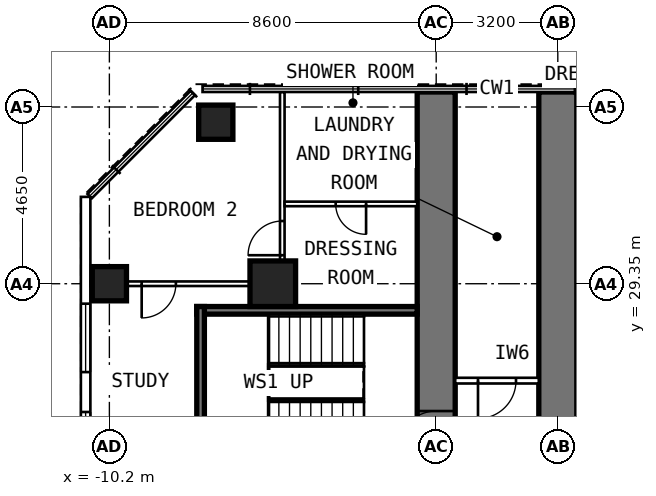
"""IFC4 building model, lengths in metres.
Left out: names, types, materials, properties, quantities, classifications, styles, units other than length and angle.
Written with IfcOpenShell. Run it as: python <this file> out.ifc"""

import sys

from ifc_helpers import new_model, si_unit, direction, frame, frame_2d, origin, origin_2d, place, context, subcontext, project, spatial, rectangle, extrude, element, fill, save


model = new_model("IFC4")
c1 = context("Model", 3, precision=1e-05, world=origin(), true_north=direction((0.0, 1.0)))
c2 = subcontext(c1, "Body", "Model", "MODEL_VIEW")
j1 = project(units=[si_unit("LENGTHUNIT", "METRE"), si_unit("PLANEANGLEUNIT", "RADIAN")], contexts=[c1])
p1 = place(None, origin())
s1 = spatial("IfcSite", under=j1, at=p1, CompositionType="ELEMENT")
p2 = place(p1, origin())
s2 = spatial("IfcBuilding", under=s1, at=p2, CompositionType="ELEMENT")
p3 = place(p2, frame((0.0, 0.0, 98.8)))
s3 = spatial("IfcBuildingStorey", under=s2, at=p3, CompositionType="ELEMENT", Elevation=98.8)
for number, where, z_axis, x_axis in (
    (1, (-10.2, 29.35, 0.0), (0.0, 0.0, 1.0), (0.0, 1.0, 0.0)),
    (2, (-7.4, 33.6, 0.0), (0.0, 0.0, 1.0), (0.0, 1.0, 0.0)),
):
    element("IfcColumn", number, at=place(p3, frame(where, z_axis=z_axis, x_axis=x_axis)), inside=s3, PredefinedType="COLUMN", context=c2, shape_type="SweptSolid", body=[
        extrude(rectangle(XDim=0.9, YDim=0.9, at=origin_2d()), origin(), (0.0, 0.0, 1.0), 3.6),
    ])
p4 = place(p3, frame((-5.9, 29.35, 0.0), z_axis=(0.0, 0.0, 1.0), x_axis=(0.0, 1.0, 0.0)))
e3 = element("IfcColumn", 3, at=p4, inside=s3, PredefinedType="COLUMN", context=c2, shape_type="SweptSolid", body=[
    extrude(rectangle(XDim=1.2, YDim=1.2, at=origin_2d()), origin(), (0.0, 0.0, 1.0), 3.6),
])
p5 = place(p3, frame((-1.6, 23.65, 0.0), z_axis=(0.0, 0.0, 1.0), x_axis=(0.0, 1.0, 0.0)))
e4 = element("IfcWall", 4, at=p5, inside=s3, PredefinedType="SHEAR", context=c2, shape_type="SweptSolid", body=[
    extrude(rectangle(XDim=10.745, YDim=1.0, at=frame_2d((5.373, 0.0))), origin(), (0.0, 0.0, 1.0), 3.6),
])
p6 = place(p5, frame((1.35, 0.0, 0.0)))
e5 = element("IfcOpeningElement", 5, at=p6, cuts=e4, PredefinedType="OPENING", context=c2, shape_type="SweptSolid", body=[
    extrude(rectangle(XDim=1.0, YDim=2.1, at=frame_2d((0.5, 1.05))), frame((0.0, 0.512, 0.0), z_axis=(0.0, -1.0, 0.0), x_axis=(1.0, 0.0, 0.0)), (0.0, 0.0, 1.0), 1.024),
])
p7 = place(p3, frame((1.6, 23.65, 0.0), z_axis=(0.0, 0.0, 1.0), x_axis=(0.0, 1.0, 0.0)))
e6 = element("IfcWall", 6, at=p7, inside=s3, PredefinedType="SHEAR", context=c2, shape_type="SweptSolid", body=[
    extrude(rectangle(XDim=10.745, YDim=1.0, at=frame_2d((5.373, 0.0))), origin(), (0.0, 0.0, 1.0), 3.6),
])
p8 = place(p3, frame((-10.825, 6.148, 0.0), z_axis=(0.0, 0.0, 1.0), x_axis=(0.0, 1.0, 0.0)))
e7 = element("IfcWall", 7, at=p8, inside=s3, PredefinedType="SOLIDWALL", context=c2, shape_type="SweptSolid", body=[
    extrude(rectangle(XDim=25.487, YDim=0.25, at=frame_2d((12.744, 0.0))), origin(), (0.0, 0.0, 1.0), 3.35),
])
p9 = place(p8, frame((0.927, 0.0, 0.8)))
e8 = element("IfcOpeningElement", 8, at=p9, cuts=e7, PredefinedType="OPENING", context=c2, shape_type="SweptSolid", body=[
    extrude(rectangle(XDim=1.8, YDim=1.8, at=frame_2d((0.9, 0.9))), frame((0.0, 0.137, 0.0), z_axis=(0.0, -1.0, 0.0), x_axis=(1.0, 0.0, 0.0)), (0.0, 0.0, 1.0), 0.274),
])
p10 = place(p8, frame((3.777, 0.0, 0.8)))
e9 = element("IfcOpeningElement", 9, at=p10, cuts=e7, PredefinedType="OPENING", context=c2, shape_type="SweptSolid", body=[
    extrude(rectangle(XDim=1.8, YDim=1.8, at=frame_2d((0.9, 0.9))), frame((0.0, 0.137, 0.0), z_axis=(0.0, -1.0, 0.0), x_axis=(1.0, 0.0, 0.0)), (0.0, 0.0, 1.0), 0.274),
])
p11 = place(p8, frame((6.627, 0.0, 0.8)))
e10 = element("IfcOpeningElement", 10, at=p11, cuts=e7, PredefinedType="OPENING", context=c2, shape_type="SweptSolid", body=[
    extrude(rectangle(XDim=1.8, YDim=1.8, at=frame_2d((0.9, 0.9))), frame((0.0, 0.137, 0.0), z_axis=(0.0, -1.0, 0.0), x_axis=(1.0, 0.0, 0.0)), (0.0, 0.0, 1.0), 0.274),
])
p12 = place(p8, frame((9.477, 0.0, 0.8)))
e11 = element("IfcOpeningElement", 11, at=p12, cuts=e7, PredefinedType="OPENING", context=c2, shape_type="SweptSolid", body=[
    extrude(rectangle(XDim=1.8, YDim=1.8, at=frame_2d((0.9, 0.9))), frame((0.0, 0.137, 0.0), z_axis=(0.0, -1.0, 0.0), x_axis=(1.0, 0.0, 0.0)), (0.0, 0.0, 1.0), 0.274),
])
p13 = place(p8, frame((12.327, 0.0, 0.8)))
e12 = element("IfcOpeningElement", 12, at=p13, cuts=e7, PredefinedType="OPENING", context=c2, shape_type="SweptSolid", body=[
    extrude(rectangle(XDim=1.8, YDim=1.8, at=frame_2d((0.9, 0.9))), frame((0.0, 0.137, 0.0), z_axis=(0.0, -1.0, 0.0), x_axis=(1.0, 0.0, 0.0)), (0.0, 0.0, 1.0), 0.274),
])
p14 = place(p8, frame((15.177, 0.0, 0.8)))
e13 = element("IfcOpeningElement", 13, at=p14, cuts=e7, PredefinedType="OPENING", context=c2, shape_type="SweptSolid", body=[
    extrude(rectangle(XDim=1.8, YDim=1.8, at=frame_2d((0.9, 0.9))), frame((0.0, 0.137, 0.0), z_axis=(0.0, -1.0, 0.0), x_axis=(1.0, 0.0, 0.0)), (0.0, 0.0, 1.0), 0.274),
])
p15 = place(p8, frame((18.027, 0.0, 0.8)))
e14 = element("IfcOpeningElement", 14, at=p15, cuts=e7, PredefinedType="OPENING", context=c2, shape_type="SweptSolid", body=[
    extrude(rectangle(XDim=1.8, YDim=1.8, at=frame_2d((0.9, 0.9))), frame((0.0, 0.137, 0.0), z_axis=(0.0, -1.0, 0.0), x_axis=(1.0, 0.0, 0.0)), (0.0, 0.0, 1.0), 0.274),
])
p16 = place(p8, frame((20.877, 0.0, 0.8)))
e15 = element("IfcOpeningElement", 15, at=p16, cuts=e7, PredefinedType="OPENING", context=c2, shape_type="SweptSolid", body=[
    extrude(rectangle(XDim=1.8, YDim=1.8, at=frame_2d((0.9, 0.9))), frame((0.0, 0.137, 0.0), z_axis=(0.0, -1.0, 0.0), x_axis=(1.0, 0.0, 0.0)), (0.0, 0.0, 1.0), 0.274),
])
p17 = place(p3, frame((-5.71, 29.35, 0.0), z_axis=(0.0, 0.0, 1.0), x_axis=(-1.0, 0.0, 0.0)))
e16 = element("IfcWall", 16, at=p17, inside=s3, PredefinedType="PARTITIONING", context=c2, shape_type="SweptSolid", body=[
    extrude(rectangle(XDim=4.99, YDim=0.12, at=frame_2d((2.495, 0.0))), origin(), (0.0, 0.0, 1.0), 2.45),
])
p18 = place(p17, frame((2.74, 0.0, 0.0)))
e17 = element("IfcOpeningElement", 17, at=p18, cuts=e16, PredefinedType="OPENING", context=c2, shape_type="SweptSolid", body=[
    extrude(rectangle(XDim=0.9, YDim=2.1, at=frame_2d((0.45, 1.05))), frame((0.0, 0.072, 0.0), z_axis=(0.0, -1.0, 0.0), x_axis=(1.0, 0.0, 0.0)), (0.0, 0.0, 1.0), 0.144),
])
p19 = place(p3, frame((-5.65, 28.95, 0.0), z_axis=(0.0, 0.0, 1.0), x_axis=(0.0, 1.0, 0.0)))
e18 = element("IfcWall", 18, at=p19, inside=s3, PredefinedType="PARTITIONING", context=c2, shape_type="SweptSolid", body=[
    extrude(rectangle(XDim=5.445, YDim=0.12, at=frame_2d((2.723, 0.0))), origin(), (0.0, 0.0, 1.0), 3.35),
])
p20 = place(p19, frame((1.15, 0.0, 0.0)))
e19 = element("IfcOpeningElement", 19, at=p20, cuts=e18, PredefinedType="OPENING", context=c2, shape_type="SweptSolid", body=[
    extrude(rectangle(XDim=0.9, YDim=2.1, at=frame_2d((0.45, 1.05))), frame((0.0, 0.072, 0.0), z_axis=(0.0, -1.0, 0.0), x_axis=(1.0, 0.0, 0.0)), (0.0, 0.0, 1.0), 0.144),
])
p21 = place(p3, frame((-2.1, 31.45, 0.0), z_axis=(0.0, 0.0, 1.0), x_axis=(-1.0, 0.0, 0.0)))
e20 = element("IfcWall", 20, at=p21, inside=s3, PredefinedType="PARTITIONING", context=c2, shape_type="SweptSolid", body=[
    extrude(rectangle(XDim=3.49, YDim=0.12, at=frame_2d((1.745, 0.0))), origin(), (0.0, 0.0, 1.0), 3.35),
])
p22 = place(p21, frame((1.345, 0.0, 0.0)))
e21 = element("IfcOpeningElement", 21, at=p22, cuts=e20, PredefinedType="OPENING", context=c2, shape_type="SweptSolid", body=[
    extrude(rectangle(XDim=0.8, YDim=2.1, at=frame_2d((0.4, 1.05))), frame((0.0, 0.072, 0.0), z_axis=(0.0, -1.0, 0.0), x_axis=(1.0, 0.0, 0.0)), (0.0, 0.0, 1.0), 0.144),
])
p23 = place(p3, frame((1.1, 26.8, 0.0), z_axis=(0.0, 0.0, 1.0), x_axis=(-1.0, 0.0, 0.0)))
e22 = element("IfcWall", 22, at=p23, inside=s3, PredefinedType="PARTITIONING", context=c2, shape_type="SweptSolid", body=[
    extrude(rectangle(XDim=2.2, YDim=0.15, at=frame_2d((1.1, 0.0))), origin(), (0.0, 0.0, 1.0), 3.35),
])
p24 = place(p23, frame((0.6, 0.0, 0.0)))
e23 = element("IfcOpeningElement", 23, at=p24, cuts=e22, PredefinedType="OPENING", context=c2, shape_type="SweptSolid", body=[
    extrude(rectangle(XDim=1.0, YDim=2.1, at=frame_2d((0.5, 1.05))), frame((0.0, 0.087, 0.0), z_axis=(0.0, -1.0, 0.0), x_axis=(1.0, 0.0, 0.0)), (0.0, 0.0, 1.0), 0.174),
])
p25 = place(p3, frame((-2.1, 28.65, 0.0), z_axis=(0.0, 0.0, 1.0), x_axis=(-1.0, 0.0, 0.0)))
e24 = element("IfcWall", 24, at=p25, inside=s3, PredefinedType="SHEAR", context=c2, shape_type="SweptSolid", body=[
    extrude(rectangle(XDim=5.8, YDim=0.2, at=frame_2d((2.9, 0.0))), origin(), (0.0, 0.0, 1.0), 3.33),
])
p26 = place(p3, frame((-7.8, 24.75, 0.0), z_axis=(0.0, 0.0, 1.0), x_axis=(0.0, 1.0, 0.0)))
e25 = element("IfcWall", 25, at=p26, inside=s3, PredefinedType="SHEAR", context=c2, shape_type="SweptSolid", body=[
    extrude(rectangle(XDim=4.0, YDim=0.2, at=frame_2d((2.0, 0.0))), origin(), (0.0, 0.0, 1.0), 3.33),
])
p27 = place(p15, origin())
e26 = element("IfcWindow", 26, at=p27, inside=s3, PartitioningType="SINGLE_PANEL", PredefinedType="WINDOW", context=c2, shape_type="SweptSolid", body=[
    extrude(rectangle(XDim=1.8, YDim=1.8, at=frame_2d((0.9, 0.9))), frame((0.0, 0.03, 0.0), z_axis=(0.0, -1.0, 0.0), x_axis=(1.0, 0.0, 0.0)), (0.0, 0.0, 1.0), 0.06),
])
fill(e14, e26)
p28 = place(p16, origin())
e27 = element("IfcWindow", 27, at=p28, inside=s3, PartitioningType="SINGLE_PANEL", PredefinedType="WINDOW", context=c2, shape_type="SweptSolid", body=[
    extrude(rectangle(XDim=1.8, YDim=1.8, at=frame_2d((0.9, 0.9))), frame((0.0, 0.03, 0.0), z_axis=(0.0, -1.0, 0.0), x_axis=(1.0, 0.0, 0.0)), (0.0, 0.0, 1.0), 0.06),
])
fill(e15, e27)
p29 = place(p18, origin())
e28 = element("IfcDoor", 28, at=p29, inside=s3, OperationType="SINGLE_SWING_RIGHT", PredefinedType="DOOR", context=c2, shape_type="SweptSolid", body=[
    extrude(rectangle(XDim=0.9, YDim=2.1, at=frame_2d((0.45, 1.05))), frame((0.0, 0.025, 0.0), z_axis=(0.0, -1.0, 0.0), x_axis=(1.0, 0.0, 0.0)), (0.0, 0.0, 1.0), 0.05),
])
fill(e17, e28)
p30 = place(p20, origin())
e29 = element("IfcDoor", 29, at=p30, inside=s3, OperationType="SINGLE_SWING_LEFT", PredefinedType="DOOR", context=c2, shape_type="SweptSolid", body=[
    extrude(rectangle(XDim=0.9, YDim=2.1, at=frame_2d((0.45, 1.05))), frame((0.0, 0.025, 0.0), z_axis=(0.0, -1.0, 0.0), x_axis=(1.0, 0.0, 0.0)), (0.0, 0.0, 1.0), 0.05),
])
fill(e19, e29)
p31 = place(p22, origin())
e30 = element("IfcDoor", 30, at=p31, inside=s3, OperationType="SINGLE_SWING_LEFT", PredefinedType="DOOR", context=c2, shape_type="SweptSolid", body=[
    extrude(rectangle(XDim=0.8, YDim=2.1, at=frame_2d((0.4, 1.05))), frame((0.0, 0.025, 0.0), z_axis=(0.0, -1.0, 0.0), x_axis=(1.0, 0.0, 0.0)), (0.0, 0.0, 1.0), 0.05),
])
fill(e21, e30)
p32 = place(p24, origin())
e31 = element("IfcDoor", 31, at=p32, inside=s3, OperationType="SINGLE_SWING_RIGHT", PredefinedType="DOOR", context=c2, shape_type="SweptSolid", body=[
    extrude(rectangle(XDim=1.0, YDim=2.1, at=frame_2d((0.5, 1.05))), frame((0.0, 0.025, 0.0), z_axis=(0.0, -1.0, 0.0), x_axis=(1.0, 0.0, 0.0)), (0.0, 0.0, 1.0), 0.05),
])
fill(e23, e31)
p33 = place(p6, origin())
e32 = element("IfcDoor", 32, at=p33, inside=s3, OperationType="SINGLE_SWING_LEFT", PredefinedType="DOOR", context=c2, shape_type="SweptSolid", body=[
    extrude(rectangle(XDim=1.0, YDim=2.1, at=frame_2d((0.5, 1.05))), frame((0.0, 0.25, 0.0), z_axis=(0.0, -1.0, 0.0), x_axis=(1.0, 0.0, 0.0)), (0.0, 0.0, 1.0), 0.5),
])
fill(e5, e32)
save(model, sys.argv[1])
